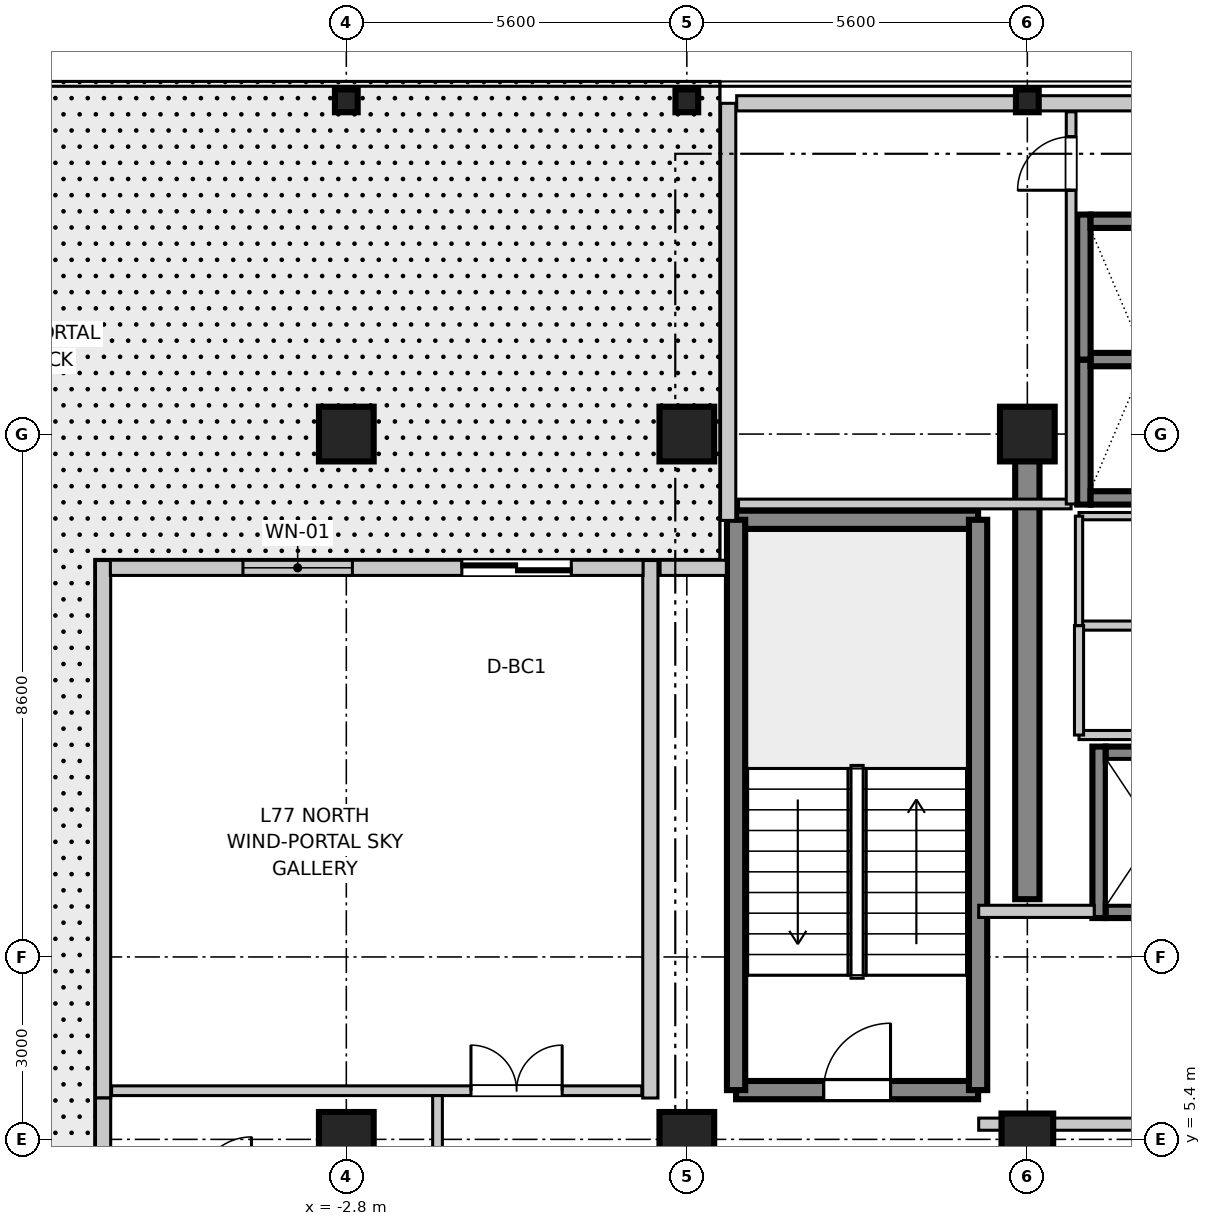
"""IFC4 building model, lengths in metres.
Left out: names, types, materials, properties, quantities, classifications, styles, units other than length and angle.
Written with IfcOpenShell. Run it as: python <this file> out.ifc"""

import sys

from ifc_helpers import new_model, si_unit, direction, frame, frame_2d, origin, origin_2d, place, context, subcontext, project, spatial, rectangle, i_section, extrude, source, transform, mapped, element, fill, save


model = new_model("IFC4")
c1 = context("Model", 3, precision=1e-05, world=origin(), true_north=direction((0.0, 1.0)))
c2 = subcontext(c1, "Body", "Model", "MODEL_VIEW")
j1 = project(units=[si_unit("LENGTHUNIT", "METRE"), si_unit("PLANEANGLEUNIT", "RADIAN")], contexts=[c1])
p1 = place(None, origin())
s1 = spatial("IfcSite", under=j1, at=p1, CompositionType="ELEMENT")
p2 = place(p1, origin())
s2 = spatial("IfcBuilding", under=s1, at=p2, CompositionType="ELEMENT")
p3 = place(p2, frame((0.0, 0.0, 300.35)))
s3 = spatial("IfcBuildingStorey", under=s2, at=p3, CompositionType="ELEMENT", Elevation=300.35)
m1 = source(origin(), c2, "Body", "SweptSolid", [
    extrude(rectangle(XDim=0.9, YDim=0.9, at=origin_2d()), origin(), (0.0, 0.0, 1.0), 3.805),
])
for number, where, z_axis, x_axis in (
    (1, (-2.8, 5.4, 0.0), (0.0, 0.0, 1.0), (1.0, 0.0, 0.0)),
    (2, (-2.8, 17.0, 0.0), (0.0, 0.0, 1.0), (1.0, 0.0, 0.0)),
    (3, (2.8, 5.4, 0.0), (0.0, 0.0, 1.0), (1.0, 0.0, 0.0)),
    (4, (2.8, 17.0, 0.0), (0.0, 0.0, 1.0), (1.0, 0.0, 0.0)),
):
    element("IfcColumn", number, at=place(p3, frame(where, z_axis=z_axis, x_axis=x_axis)), inside=s3, PredefinedType="COLUMN", context=c2, shape_type="MappedRepresentation", body=[
        mapped(m1, transform((0.0, 0.0, 0.0), scale=1.0)),
    ])
m2 = source(origin(), c2, "Body", "SweptSolid", [
    extrude(rectangle(XDim=0.85, YDim=0.85, at=origin_2d()), origin(), (0.0, 0.0, 1.0), 3.805),
])
p4 = place(p3, frame((8.4, 5.4, 0.0), z_axis=(0.0, 0.0, 1.0), x_axis=(1.0, 0.0, 0.0)))
e5 = element("IfcColumn", 5, at=p4, inside=s3, PredefinedType="PILASTER", context=c2, shape_type="MappedRepresentation", body=[
    mapped(m2, transform((0.0, 0.0, 0.0), scale=1.0)),
])
p5 = place(p3, frame((8.4, 17.0, 0.0), z_axis=(0.0, 0.0, 1.0), x_axis=(1.0, 0.0, 0.0)))
e6 = element("IfcColumn", 6, at=p5, inside=s3, PredefinedType="COLUMN", context=c2, shape_type="MappedRepresentation", body=[
    mapped(m1, transform((0.0, 0.0, 0.0), scale=1.0)),
])
m3 = source(origin(), c2, "Body", "SweptSolid", [
    extrude(i_section(OverallWidth=0.374, OverallDepth=0.374, WebThickness=0.014, FlangeThickness=0.023, at=origin_2d()), origin(), (0.0, 0.0, 1.0), 3.805),
])
for number, where, z_axis, x_axis in (
    (7, (-2.8, 22.48, 0.0), (0.0, 0.0, 1.0), (0.0, 1.0, 0.0)),
    (8, (2.8, 22.48, 0.0), (0.0, 0.0, 1.0), (0.0, 1.0, 0.0)),
    (9, (8.4, 22.48, 0.0), (0.0, 0.0, 1.0), (0.0, 1.0, 0.0)),
):
    element("IfcColumn", number, at=place(p3, frame(where, z_axis=z_axis, x_axis=x_axis)), inside=s3, PredefinedType="COLUMN", context=c2, shape_type="MappedRepresentation", body=[
        mapped(m3, transform((0.0, 0.0, 0.0), scale=1.0)),
    ])
m4 = source(origin(), c2, "Body", "SweptSolid", [
    extrude(rectangle(XDim=7.65, YDim=0.4, at=frame_2d((3.825, 0.0))), origin(), (0.0, 0.0, 1.0), 3.55),
])
p6 = place(p3, frame((8.4, 9.35, 0.0), z_axis=(0.0, 0.0, 1.0), x_axis=(0.0, 1.0, 0.0)))
e10 = element("IfcWall", 10, at=p6, inside=s3, PredefinedType="SHEAR", context=c2, shape_type="MappedRepresentation", body=[
    mapped(m4, transform((0.0, 0.0, 0.0), scale=1.0)),
])
m5 = source(origin(), c2, "Body", "SweptSolid", [
    extrude(rectangle(XDim=3.98, YDim=0.3, at=frame_2d((1.99, 0.0))), origin(), (0.0, 0.0, 1.0), 3.55),
])
p7 = place(p3, frame((3.61, 6.21, 0.0), z_axis=(0.0, 0.0, 1.0), x_axis=(1.0, 0.0, 0.0)))
e11 = element("IfcWall", 11, at=p7, inside=s3, PredefinedType="SHEAR", context=c2, shape_type="MappedRepresentation", body=[
    mapped(m5, transform((0.0, 0.0, 0.0), scale=1.0)),
])
p8 = place(p7, frame((1.44, 0.0, 0.0)))
e12 = element("IfcOpeningElement", 12, at=p8, cuts=e11, PredefinedType="OPENING", context=c2, shape_type="SweptSolid", body=[
    extrude(rectangle(XDim=1.1, YDim=2.15, at=frame_2d((0.55, 1.075))), frame((0.0, 0.16, 0.0), z_axis=(0.0, -1.0, 0.0), x_axis=(1.0, 0.0, 0.0)), (0.0, 0.0, 1.0), 0.32),
])
p9 = place(p3, frame((3.61, 15.59, 0.0), z_axis=(0.0, 0.0, 1.0), x_axis=(1.0, 0.0, 0.0)))
e13 = element("IfcWall", 13, at=p9, inside=s3, PredefinedType="SHEAR", context=c2, shape_type="MappedRepresentation", body=[
    mapped(m5, transform((0.0, 0.0, 0.0), scale=1.0)),
])
m6 = source(origin(), c2, "Body", "SweptSolid", [
    extrude(rectangle(XDim=9.38, YDim=0.3, at=frame_2d((4.69, 0.0))), origin(), (0.0, 0.0, 1.0), 3.55),
])
for number, where, z_axis, x_axis in (
    (14, (3.61, 6.21, 0.0), (0.0, 0.0, 1.0), (0.0, 1.0, 0.0)),
    (15, (7.59, 6.21, 0.0), (0.0, 0.0, 1.0), (0.0, 1.0, 0.0)),
):
    element("IfcWall", number, at=place(p3, frame(where, z_axis=z_axis, x_axis=x_axis)), inside=s3, PredefinedType="SHEAR", context=c2, shape_type="MappedRepresentation", body=[
        mapped(m6, transform((0.0, 0.0, 0.0), scale=1.0)),
    ])
m7 = source(origin(), c2, "Body", "SweptSolid", [
    extrude(rectangle(XDim=2.385, YDim=0.22, at=frame_2d((1.192, 0.0))), origin(), (0.0, 0.0, 1.0), 3.55),
])
p10 = place(p3, frame((9.33, 15.84, 0.0), z_axis=(0.0, 0.0, 1.0), x_axis=(0.0, 1.0, 0.0)))
e16 = element("IfcWall", 16, at=p10, inside=s3, PredefinedType="SHEAR", context=c2, shape_type="MappedRepresentation", body=[
    mapped(m7, transform((0.0, 0.0, 0.0), scale=1.0)),
])
m8 = source(origin(), c2, "Body", "SweptSolid", [
    extrude(rectangle(XDim=1.82, YDim=0.22, at=frame_2d((0.91, 0.0))), origin(), (0.0, 0.0, 1.0), 3.55),
])
p11 = place(p3, frame((9.44, 15.95, 0.0), z_axis=(0.0, 0.0, 1.0), x_axis=(1.0, 0.0, 0.0)))
e17 = element("IfcWall", 17, at=p11, inside=s3, PredefinedType="SHEAR", context=c2, shape_type="MappedRepresentation", body=[
    mapped(m8, transform((0.0, 0.0, 0.0), scale=1.0)),
])
m9 = source(origin(), c2, "Body", "SweptSolid", [
    extrude(rectangle(XDim=1.82, YDim=0.22, at=frame_2d((0.91, 0.0))), origin(), (0.0, 0.0, 1.0), 3.85),
])
p12 = place(p3, frame((9.44, 18.225, 0.0), z_axis=(0.0, 0.0, 1.0), x_axis=(1.0, 0.0, 0.0)))
e18 = element("IfcWall", 18, at=p12, inside=s3, PredefinedType="SHEAR", context=c2, shape_type="MappedRepresentation", body=[
    mapped(m9, transform((0.0, 0.0, 0.0), scale=1.0)),
])
p13 = place(p3, frame((9.33, 18.225, 0.0), z_axis=(0.0, 0.0, 1.0), x_axis=(0.0, 1.0, 0.0)))
e19 = element("IfcWall", 19, at=p13, inside=s3, PredefinedType="SHEAR", context=c2, shape_type="MappedRepresentation", body=[
    mapped(m7, transform((0.0, 0.0, 0.0), scale=1.0)),
])
p14 = place(p3, frame((9.44, 20.5, 0.0), z_axis=(0.0, 0.0, 1.0), x_axis=(1.0, 0.0, 0.0)))
e20 = element("IfcWall", 20, at=p14, inside=s3, PredefinedType="SHEAR", context=c2, shape_type="MappedRepresentation", body=[
    mapped(m8, transform((0.0, 0.0, 0.0), scale=1.0)),
])
m10 = source(origin(), c2, "Body", "SweptSolid", [
    extrude(rectangle(XDim=2.82, YDim=0.22, at=frame_2d((1.41, 0.0))), origin(), (0.0, 0.0, 1.0), 3.55),
])
p15 = place(p3, frame((9.58, 9.04, 0.0), z_axis=(0.0, 0.0, 1.0), x_axis=(0.0, 1.0, 0.0)))
e21 = element("IfcWall", 21, at=p15, inside=s3, PredefinedType="SHEAR", context=c2, shape_type="MappedRepresentation", body=[
    mapped(m10, transform((0.0, 0.0, 0.0), scale=1.0)),
])
m11 = source(origin(), c2, "Body", "SweptSolid", [
    extrude(rectangle(XDim=1.62, YDim=0.22, at=frame_2d((0.81, 0.0))), origin(), (0.0, 0.0, 1.0), 3.55),
])
for number, where, z_axis, x_axis in (
    (22, (9.69, 9.15, 0.0), (0.0, 0.0, 1.0), (1.0, 0.0, 0.0)),
    (23, (9.69, 11.75, 0.0), (0.0, 0.0, 1.0), (1.0, 0.0, 0.0)),
):
    element("IfcWall", number, at=place(p3, frame(where, z_axis=z_axis, x_axis=x_axis)), inside=s3, PredefinedType="SHEAR", context=c2, shape_type="MappedRepresentation", body=[
        mapped(m11, transform((0.0, 0.0, 0.0), scale=1.0)),
    ])
m12 = source(origin(), c2, "Body", "SweptSolid", [
    extrude(rectangle(XDim=8.84, YDim=0.25, at=frame_2d((4.42, 0.0))), origin(), (0.0, 0.0, 1.0), 2.99),
])
for number, where, z_axis, x_axis in (
    (24, (-6.8, 6.08, 0.0), (0.0, 0.0, 1.0), (0.0, 1.0, 0.0)),
    (25, (2.2, 6.08, 0.0), (0.0, 0.0, 1.0), (0.0, 1.0, 0.0)),
):
    element("IfcWall", number, at=place(p3, frame(where, z_axis=z_axis, x_axis=x_axis)), inside=s3, PredefinedType="STANDARD", context=c2, shape_type="MappedRepresentation", body=[
        mapped(m12, transform((0.0, 0.0, 0.0), scale=1.0)),
    ])
m13 = source(origin(), c2, "Body", "SweptSolid", [
    extrude(rectangle(XDim=8.76, YDim=0.25, at=frame_2d((4.38, 0.0))), origin(), (0.0, 0.0, 1.0), 2.99),
])
p16 = place(p3, frame((-6.68, 14.8, 0.0), z_axis=(0.0, 0.0, 1.0), x_axis=(1.0, 0.0, 0.0)))
e26 = element("IfcWall", 26, at=p16, inside=s3, PredefinedType="STANDARD", context=c2, shape_type="MappedRepresentation", body=[
    mapped(m13, transform((0.0, 0.0, 0.0), scale=1.0)),
])
p17 = place(p16, frame((5.78, 0.0, 0.0)))
e27 = element("IfcOpeningElement", 27, at=p17, cuts=e26, PredefinedType="OPENING", context=c2, shape_type="SweptSolid", body=[
    extrude(rectangle(XDim=1.8, YDim=2.25, at=frame_2d((0.9, 1.125))), frame((0.0, 0.135, 0.0), z_axis=(0.0, -1.0, 0.0), x_axis=(1.0, 0.0, 0.0)), (0.0, 0.0, 1.0), 0.27),
])
p18 = place(p16, frame((2.18, 0.0, 0.85)))
e28 = element("IfcOpeningElement", 28, at=p18, cuts=e26, PredefinedType="OPENING", context=c2, shape_type="SweptSolid", body=[
    extrude(rectangle(XDim=1.8, YDim=1.5, at=frame_2d((0.9, 0.75))), frame((0.0, 0.135, 0.0), z_axis=(0.0, -1.0, 0.0), x_axis=(1.0, 0.0, 0.0)), (0.0, 0.0, 1.0), 0.27),
])
m14 = source(origin(), c2, "Body", "SweptSolid", [
    extrude(rectangle(XDim=3.82, YDim=0.2, at=frame_2d((1.91, 0.0))), origin(), (0.0, 0.0, 1.0), 2.89),
])
p19 = place(p3, frame((7.6, 5.65, 0.0), z_axis=(0.0, 0.0, 1.0), x_axis=(1.0, 0.0, 0.0)))
e29 = element("IfcWall", 29, at=p19, inside=s3, PredefinedType="PARTITIONING", context=c2, shape_type="MappedRepresentation", body=[
    mapped(m14, transform((0.0, 0.0, 0.0), scale=1.0)),
])
m15 = source(origin(), c2, "Body", "SweptSolid", [
    extrude(rectangle(XDim=1.9, YDim=0.2, at=frame_2d((0.95, 0.0))), origin(), (0.0, 0.0, 1.0), 2.89),
])
p20 = place(p3, frame((7.6, 9.15, 0.0), z_axis=(0.0, 0.0, 1.0), x_axis=(1.0, 0.0, 0.0)))
e30 = element("IfcWall", 30, at=p20, inside=s3, PredefinedType="PARTITIONING", context=c2, shape_type="MappedRepresentation", body=[
    mapped(m15, transform((0.0, 0.0, 0.0), scale=1.0)),
])
m16 = source(origin(), c2, "Body", "SweptSolid", [
    extrude(rectangle(XDim=1.75, YDim=0.15, at=frame_2d((0.875, 0.0))), origin(), (0.0, 0.0, 1.0), 2.89),
])
for number, where, z_axis, x_axis in (
    (31, (9.25, 12.05, 0.0), (0.0, 0.0, 1.0), (1.0, 0.0, 0.0)),
    (32, (9.25, 13.85, 0.0), (0.0, 0.0, 1.0), (1.0, 0.0, 0.0)),
):
    element("IfcWall", number, at=place(p3, frame(where, z_axis=z_axis, x_axis=x_axis)), inside=s3, PredefinedType="PARTITIONING", context=c2, shape_type="MappedRepresentation", body=[
        mapped(m16, transform((0.0, 0.0, 0.0), scale=1.0)),
    ])
m17 = source(origin(), c2, "Body", "SweptSolid", [
    extrude(rectangle(XDim=1.8, YDim=0.15, at=frame_2d((0.9, 0.0))), origin(), (0.0, 0.0, 1.0), 2.89),
])
p21 = place(p3, frame((9.25, 12.05, 0.0), z_axis=(0.0, 0.0, 1.0), x_axis=(0.0, 1.0, 0.0)))
e33 = element("IfcWall", 33, at=p21, inside=s3, PredefinedType="PARTITIONING", context=c2, shape_type="MappedRepresentation", body=[
    mapped(m17, transform((0.0, 0.0, 0.0), scale=1.0)),
])
m18 = source(origin(), c2, "Body", "SweptSolid", [
    extrude(rectangle(XDim=1.75, YDim=0.12, at=frame_2d((0.875, 0.0))), origin(), (0.0, 0.0, 1.0), 2.89),
])
p22 = place(p3, frame((9.25, 15.65, 0.0), z_axis=(0.0, 0.0, 1.0), x_axis=(1.0, 0.0, 0.0)))
e34 = element("IfcWall", 34, at=p22, inside=s3, PredefinedType="PARTITIONING", context=c2, shape_type="MappedRepresentation", body=[
    mapped(m18, transform((0.0, 0.0, 0.0), scale=1.0)),
])
m19 = source(origin(), c2, "Body", "SweptSolid", [
    extrude(rectangle(XDim=1.8, YDim=0.12, at=frame_2d((0.9, 0.0))), origin(), (0.0, 0.0, 1.0), 2.89),
])
p23 = place(p3, frame((9.25, 13.85, 0.0), z_axis=(0.0, 0.0, 1.0), x_axis=(0.0, 1.0, 0.0)))
e35 = element("IfcWall", 35, at=p23, inside=s3, PredefinedType="PARTITIONING", context=c2, shape_type="MappedRepresentation", body=[
    mapped(m19, transform((0.0, 0.0, 0.0), scale=1.0)),
])
m20 = source(origin(), c2, "Body", "SweptSolid", [
    extrude(rectangle(XDim=2.72, YDim=0.25, at=frame_2d((1.36, 0.0))), origin(), (0.0, 0.0, 1.0), 2.89),
])
p24 = place(p3, frame((-6.8, 3.36, 0.0), z_axis=(0.0, 0.0, 1.0), x_axis=(0.0, 1.0, 0.0)))
e36 = element("IfcWall", 36, at=p24, inside=s3, PredefinedType="STANDARD", context=c2, shape_type="MappedRepresentation", body=[
    mapped(m20, transform((0.0, 0.0, 0.0), scale=1.0)),
])
m21 = source(origin(), c2, "Body", "SweptSolid", [
    extrude(rectangle(XDim=1.09, YDim=0.25, at=frame_2d((0.545, 0.0))), origin(), (0.0, 0.0, 1.0), 2.89),
])
p25 = place(p3, frame((2.36, 14.8, 0.0), z_axis=(0.0, 0.0, 1.0), x_axis=(1.0, 0.0, 0.0)))
e37 = element("IfcWall", 37, at=p25, inside=s3, PredefinedType="STANDARD", context=c2, shape_type="MappedRepresentation", body=[
    mapped(m21, transform((0.0, 0.0, 0.0), scale=1.0)),
])
m22 = source(origin(), c2, "Body", "SweptSolid", [
    extrude(rectangle(XDim=6.86, YDim=0.25, at=frame_2d((3.43, 0.0))), origin(), (0.0, 0.0, 1.0), 2.89),
])
p26 = place(p3, frame((3.48, 15.58, 0.0), z_axis=(0.0, 0.0, 1.0), x_axis=(0.0, 1.0, 0.0)))
e38 = element("IfcWall", 38, at=p26, inside=s3, PredefinedType="STANDARD", context=c2, shape_type="MappedRepresentation", body=[
    mapped(m22, transform((0.0, 0.0, 0.0), scale=1.0)),
])
m23 = source(origin(), c2, "Body", "SweptSolid", [
    extrude(rectangle(XDim=16.0, YDim=0.25, at=frame_2d((8.0, 0.0))), origin(), (0.0, 0.0, 1.0), 2.89),
])
p27 = place(p3, frame((3.62, 22.44, 0.0), z_axis=(0.0, 0.0, 1.0), x_axis=(1.0, 0.0, 0.0)))
e39 = element("IfcWall", 39, at=p27, inside=s3, PredefinedType="STANDARD", context=c2, shape_type="MappedRepresentation", body=[
    mapped(m23, transform((0.0, 0.0, 0.0), scale=1.0)),
])
m24 = source(origin(), c2, "Body", "SweptSolid", [
    extrude(rectangle(XDim=8.72, YDim=0.16, at=frame_2d((4.36, 0.0))), origin(), (0.0, 0.0, 1.0), 2.89),
])
p28 = place(p3, frame((-6.66, 6.2, 0.0), z_axis=(0.0, 0.0, 1.0), x_axis=(1.0, 0.0, 0.0)))
e40 = element("IfcWall", 40, at=p28, inside=s3, PredefinedType="PARTITIONING", context=c2, shape_type="MappedRepresentation", body=[
    mapped(m24, transform((0.0, 0.0, 0.0), scale=1.0)),
])
p29 = place(p28, frame((5.91, 0.0, 0.0)))
e41 = element("IfcOpeningElement", 41, at=p29, cuts=e40, PredefinedType="OPENING", context=c2, shape_type="SweptSolid", body=[
    extrude(rectangle(XDim=1.5, YDim=2.15, at=frame_2d((0.75, 1.075))), frame((0.0, 0.09, 0.0), z_axis=(0.0, -1.0, 0.0), x_axis=(1.0, 0.0, 0.0)), (0.0, 0.0, 1.0), 0.18),
])
m25 = source(origin(), c2, "Body", "SweptSolid", [
    extrude(rectangle(XDim=1.56, YDim=0.16, at=frame_2d((0.78, 0.0))), origin(), (0.0, 0.0, 1.0), 2.89),
])
p30 = place(p3, frame((-1.3, 4.56, 0.0), z_axis=(0.0, 0.0, 1.0), x_axis=(0.0, 1.0, 0.0)))
e42 = element("IfcWall", 42, at=p30, inside=s3, PredefinedType="PARTITIONING", context=c2, shape_type="MappedRepresentation", body=[
    mapped(m25, transform((0.0, 0.0, 0.0), scale=1.0)),
])
m26 = source(origin(), c2, "Body", "SweptSolid", [
    extrude(rectangle(XDim=5.47, YDim=0.16, at=frame_2d((2.735, 0.0))), origin(), (0.0, 0.0, 1.0), 2.89),
])
p31 = place(p3, frame((3.65, 15.85, 0.0), z_axis=(0.0, 0.0, 1.0), x_axis=(1.0, 0.0, 0.0)))
e43 = element("IfcWall", 43, at=p31, inside=s3, PredefinedType="PARTITIONING", context=c2, shape_type="MappedRepresentation", body=[
    mapped(m26, transform((0.0, 0.0, 0.0), scale=1.0)),
])
m27 = source(origin(), c2, "Body", "SweptSolid", [
    extrude(rectangle(XDim=6.45, YDim=0.16, at=frame_2d((3.225, 0.0))), origin(), (0.0, 0.0, 1.0), 2.89),
])
p32 = place(p3, frame((9.12, 15.85, 0.0), z_axis=(0.0, 0.0, 1.0), x_axis=(0.0, 1.0, 0.0)))
e44 = element("IfcWall", 44, at=p32, inside=s3, PredefinedType="PARTITIONING", context=c2, shape_type="MappedRepresentation", body=[
    mapped(m27, transform((0.0, 0.0, 0.0), scale=1.0)),
])
p33 = place(p32, frame((5.16, 0.0, 0.0)))
e45 = element("IfcOpeningElement", 45, at=p33, cuts=e44, PredefinedType="OPENING", context=c2, shape_type="SweptSolid", body=[
    extrude(rectangle(XDim=0.88, YDim=2.1, at=frame_2d((0.44, 1.05))), frame((0.0, 0.09, 0.0), z_axis=(0.0, -1.0, 0.0), x_axis=(1.0, 0.0, 0.0)), (0.0, 0.0, 1.0), 0.18),
])
m28 = source(origin(), c2, "Body", "SweptSolid", [
    extrude(rectangle(XDim=1.1, YDim=2.15, at=frame_2d((0.55, 1.075))), frame((0.0, 0.025, 0.0), z_axis=(0.0, -1.0, 0.0), x_axis=(1.0, 0.0, 0.0)), (0.0, 0.0, 1.0), 0.05),
])
p34 = place(p8, origin())
e46 = element("IfcDoor", 46, at=p34, inside=s3, OperationType="SINGLE_SWING_RIGHT", PredefinedType="DOOR", context=c2, shape_type="MappedRepresentation", body=[
    mapped(m28, transform((0.0, 0.0, 0.0), scale=1.0)),
])
fill(e12, e46)
m29 = source(origin(), c2, "Body", "SweptSolid", [
    extrude(rectangle(XDim=1.8, YDim=2.25, at=frame_2d((0.9, 1.125))), frame((0.0, 0.025, 0.0), z_axis=(0.0, -1.0, 0.0), x_axis=(1.0, 0.0, 0.0)), (0.0, 0.0, 1.0), 0.05),
])
p35 = place(p17, origin())
e47 = element("IfcDoor", 47, at=p35, inside=s3, OperationType="DOUBLE_DOOR_SLIDING", PredefinedType="DOOR", context=c2, shape_type="MappedRepresentation", body=[
    mapped(m29, transform((0.0, 0.0, 0.0), scale=1.0)),
])
fill(e27, e47)
m30 = source(origin(), c2, "Body", "SweptSolid", [
    extrude(rectangle(XDim=1.8, YDim=1.5, at=frame_2d((0.9, 0.75))), frame((0.0, 0.03, 0.0), z_axis=(0.0, -1.0, 0.0), x_axis=(1.0, 0.0, 0.0)), (0.0, 0.0, 1.0), 0.06),
])
p36 = place(p18, origin())
e48 = element("IfcWindow", 48, at=p36, inside=s3, PartitioningType="SINGLE_PANEL", PredefinedType="WINDOW", context=c2, shape_type="MappedRepresentation", body=[
    mapped(m30, transform((0.0, 0.0, 0.0), scale=1.0)),
])
fill(e28, e48)
m31 = source(origin(), c2, "Body", "SweptSolid", [
    extrude(rectangle(XDim=1.5, YDim=2.15, at=frame_2d((0.75, 1.075))), frame((0.0, 0.025, 0.0), z_axis=(0.0, -1.0, 0.0), x_axis=(1.0, 0.0, 0.0)), (0.0, 0.0, 1.0), 0.05),
])
p37 = place(p29, origin())
e49 = element("IfcDoor", 49, at=p37, inside=s3, OperationType="DOUBLE_DOOR_SINGLE_SWING", PredefinedType="DOOR", context=c2, shape_type="MappedRepresentation", body=[
    mapped(m31, transform((0.0, 0.0, 0.0), scale=1.0)),
])
fill(e41, e49)
m32 = source(origin(), c2, "Body", "SweptSolid", [
    extrude(rectangle(XDim=0.88, YDim=2.1, at=frame_2d((0.44, 1.05))), frame((0.0, 0.025, 0.0), z_axis=(0.0, -1.0, 0.0), x_axis=(1.0, 0.0, 0.0)), (0.0, 0.0, 1.0), 0.05),
])
p38 = place(p33, origin())
e50 = element("IfcDoor", 50, at=p38, inside=s3, OperationType="SINGLE_SWING_LEFT", PredefinedType="DOOR", context=c2, shape_type="MappedRepresentation", body=[
    mapped(m32, transform((0.0, 0.0, 0.0), scale=1.0)),
])
fill(e45, e50)
save(model, sys.argv[1])
